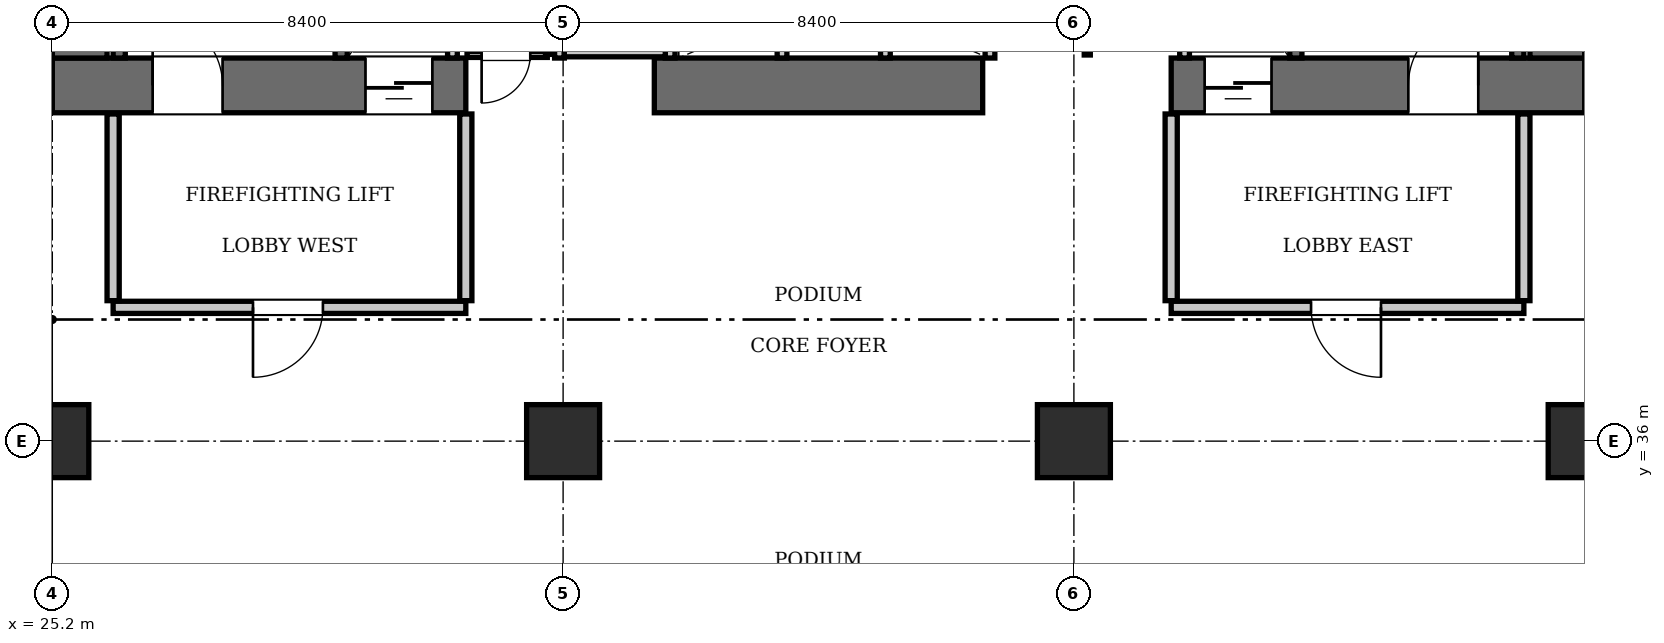
"""IFC4 building model, lengths in metres.
Left out: names, types, materials, properties, quantities, classifications, styles, units other than length and angle.
Written with IfcOpenShell. Run it as: python <this file> out.ifc"""

import sys

from ifc_helpers import new_model, si_unit, direction, frame, frame_2d, origin, origin_2d, place, context, subcontext, project, spatial, rectangle, extrude, element, fill, save


model = new_model("IFC4")
c1 = context("Model", 3, precision=1e-05, world=origin(), true_north=direction((0.0, 1.0)))
c2 = subcontext(c1, "Body", "Model", "MODEL_VIEW")
j1 = project(units=[si_unit("LENGTHUNIT", "METRE"), si_unit("PLANEANGLEUNIT", "RADIAN")], contexts=[c1])
p1 = place(None, origin())
s1 = spatial("IfcSite", under=j1, at=p1, CompositionType="ELEMENT")
p2 = place(p1, origin())
s2 = spatial("IfcBuilding", under=s1, at=p2, CompositionType="ELEMENT")
p3 = place(p2, frame((0.0, 0.0, 10.85)))
s3 = spatial("IfcBuildingStorey", under=s2, at=p3, CompositionType="ELEMENT", Elevation=10.85)
p4 = place(p3, frame((25.2, 41.85, 0.0), z_axis=(0.0, 0.0, 1.0), x_axis=(1.0, 0.0, 0.0)))
e1 = element("IfcWall", 1, at=p4, inside=s3, PredefinedType="SHEAR", context=c2, shape_type="SweptSolid", body=[
    extrude(rectangle(XDim=6.8, YDim=0.9, at=frame_2d((3.4, 0.0))), origin(), (0.0, 0.0, 1.0), 5.6),
])
p5 = place(p4, frame((1.65, 0.0, 0.0)))
e2 = element("IfcOpeningElement", 2, at=p5, cuts=e1, PredefinedType="OPENING", context=c2, shape_type="SweptSolid", body=[
    extrude(rectangle(XDim=1.15, YDim=2.15, at=frame_2d((0.575, 1.075))), frame((0.0, 0.46, 0.0), z_axis=(0.0, -1.0, 0.0), x_axis=(1.0, 0.0, 0.0)), (0.0, 0.0, 1.0), 0.92),
])
p6 = place(p4, frame((5.15, 0.0, 0.0)))
e3 = element("IfcOpeningElement", 3, at=p6, cuts=e1, PredefinedType="OPENING", context=c2, shape_type="SweptSolid", body=[
    extrude(rectangle(XDim=1.1, YDim=2.2, at=frame_2d((0.55, 1.1))), frame((0.0, 0.46, 0.0), z_axis=(0.0, -1.0, 0.0), x_axis=(1.0, 0.0, 0.0)), (0.0, 0.0, 1.0), 0.92),
])
p7 = place(p3, frame((35.1, 41.85, 0.0), z_axis=(0.0, 0.0, 1.0), x_axis=(1.0, 0.0, 0.0)))
e4 = element("IfcWall", 4, at=p7, inside=s3, PredefinedType="SHEAR", context=c2, shape_type="SweptSolid", body=[
    extrude(rectangle(XDim=5.4, YDim=0.9, at=frame_2d((2.7, 0.0))), origin(), (0.0, 0.0, 1.0), 5.6),
])
p8 = place(p3, frame((43.6, 41.85, 0.0), z_axis=(0.0, 0.0, 1.0), x_axis=(1.0, 0.0, 0.0)))
e5 = element("IfcWall", 5, at=p8, inside=s3, PredefinedType="SHEAR", context=c2, shape_type="SweptSolid", body=[
    extrude(rectangle(XDim=6.8, YDim=0.9, at=frame_2d((3.4, 0.0))), origin(), (0.0, 0.0, 1.0), 5.6),
])
p9 = place(p8, frame((3.9, 0.0, 0.0)))
e6 = element("IfcOpeningElement", 6, at=p9, cuts=e5, PredefinedType="OPENING", context=c2, shape_type="SweptSolid", body=[
    extrude(rectangle(XDim=1.15, YDim=2.15, at=frame_2d((0.575, 1.075))), frame((0.0, 0.46, 0.0), z_axis=(0.0, -1.0, 0.0), x_axis=(1.0, 0.0, 0.0)), (0.0, 0.0, 1.0), 0.92),
])
p10 = place(p8, frame((0.55, 0.0, 0.0)))
e7 = element("IfcOpeningElement", 7, at=p10, cuts=e5, PredefinedType="OPENING", context=c2, shape_type="SweptSolid", body=[
    extrude(rectangle(XDim=1.1, YDim=2.2, at=frame_2d((0.55, 1.1))), frame((0.0, 0.46, 0.0), z_axis=(0.0, -1.0, 0.0), x_axis=(1.0, 0.0, 0.0)), (0.0, 0.0, 1.0), 0.92),
])
for number, where, z_axis, x_axis in (
    (8, (25.65, 42.3, 0.0), (0.0, 0.0, 1.0), (0.0, 1.0, 0.0)),
    (9, (49.95, 42.3, 0.0), (0.0, 0.0, 1.0), (0.0, 1.0, 0.0)),
):
    element("IfcWall", number, at=place(p3, frame(where, z_axis=z_axis, x_axis=x_axis)), inside=s3, PredefinedType="SHEAR", context=c2, shape_type="SweptSolid", body=[
        extrude(rectangle(XDim=1.6, YDim=0.9, at=frame_2d((0.8, 0.0))), origin(), (0.0, 0.0, 1.0), 5.6),
    ])
for number, where, z_axis, x_axis in (
    (10, (25.2, 36.0, 0.0), (0.0, 0.0, 1.0), (1.0, 0.0, 0.0)),
    (11, (33.6, 36.0, 0.0), (0.0, 0.0, 1.0), (1.0, 0.0, 0.0)),
    (12, (42.0, 36.0, 0.0), (0.0, 0.0, 1.0), (1.0, 0.0, 0.0)),
    (13, (50.4, 36.0, 0.0), (0.0, 0.0, 1.0), (1.0, 0.0, 0.0)),
):
    element("IfcColumn", number, at=place(p3, frame(where, z_axis=z_axis, x_axis=x_axis)), inside=s3, PredefinedType="COLUMN", context=c2, shape_type="SweptSolid", body=[
        extrude(rectangle(XDim=1.2, YDim=1.2, at=origin_2d()), origin(), (0.0, 0.0, 1.0), 5.6),
    ])
p11 = place(p3, frame((29.95, 42.3, 0.0), z_axis=(0.0, 0.0, 1.0), x_axis=(0.0, 1.0, 0.0)))
e14 = element("IfcWall", 14, at=p11, inside=s3, PredefinedType="SOLIDWALL", context=c2, shape_type="SweptSolid", body=[
    extrude(rectangle(XDim=8.85, YDim=0.2, at=frame_2d((4.425, 0.0))), origin(), (0.0, 0.0, 1.0), 5.32),
])
p12 = place(p3, frame((26.3, 42.3, 0.0), z_axis=(0.0, 0.0, 1.0), x_axis=(0.0, 1.0, 0.0)))
e15 = element("IfcWall", 15, at=p12, inside=s3, PredefinedType="SOLIDWALL", context=c2, shape_type="SweptSolid", body=[
    extrude(rectangle(XDim=1.58, YDim=0.2, at=frame_2d((0.79, 0.0))), origin(), (0.0, 0.0, 1.0), 5.32),
])
p13 = place(p3, frame((45.65, 42.3, 0.0), z_axis=(0.0, 0.0, 1.0), x_axis=(0.0, 1.0, 0.0)))
e16 = element("IfcWall", 16, at=p13, inside=s3, PredefinedType="SOLIDWALL", context=c2, shape_type="SweptSolid", body=[
    extrude(rectangle(XDim=8.85, YDim=0.2, at=frame_2d((4.425, 0.0))), origin(), (0.0, 0.0, 1.0), 5.32),
])
p14 = place(p3, frame((49.3, 42.3, 0.0), z_axis=(0.0, 0.0, 1.0), x_axis=(0.0, 1.0, 0.0)))
e17 = element("IfcWall", 17, at=p14, inside=s3, PredefinedType="SOLIDWALL", context=c2, shape_type="SweptSolid", body=[
    extrude(rectangle(XDim=1.58, YDim=0.2, at=frame_2d((0.79, 0.0))), origin(), (0.0, 0.0, 1.0), 5.32),
])
for number, where, z_axis, x_axis in (
    (18, (31.78, 42.3, 0.0), (0.0, 0.0, 1.0), (0.0, 1.0, 0.0)),
    (19, (43.82, 42.3, 0.0), (0.0, 0.0, 1.0), (0.0, 1.0, 0.0)),
):
    element("IfcWall", number, at=place(p3, frame(where, z_axis=z_axis, x_axis=x_axis)), inside=s3, PredefinedType="SOLIDWALL", context=c2, shape_type="SweptSolid", body=[
        extrude(rectangle(XDim=2.44, YDim=0.16, at=frame_2d((1.22, 0.0))), origin(), (0.0, 0.0, 1.0), 5.32),
    ])
for number, where, z_axis, x_axis in (
    (20, (37.2, 42.3, 0.0), (0.0, 0.0, 1.0), (0.0, 1.0, 0.0)),
    (21, (38.9, 42.3, 0.0), (0.0, 0.0, 1.0), (0.0, 1.0, 0.0)),
    (22, (40.62, 42.3, 0.0), (0.0, 0.0, 1.0), (0.0, 1.0, 0.0)),
):
    element("IfcWall", number, at=place(p3, frame(where, z_axis=z_axis, x_axis=x_axis)), inside=s3, PredefinedType="SOLIDWALL", context=c2, shape_type="SweptSolid", body=[
        extrude(rectangle(XDim=2.05, YDim=0.16, at=frame_2d((1.025, 0.0))), origin(), (0.0, 0.0, 1.0), 5.32),
    ])
for number, where, z_axis, x_axis in (
    (23, (33.54, 42.3, 0.0), (0.0, 0.0, 1.0), (0.0, 1.0, 0.0)),
    (24, (35.36, 42.3, 0.0), (0.0, 0.0, 1.0), (0.0, 1.0, 0.0)),
):
    element("IfcWall", number, at=place(p3, frame(where, z_axis=z_axis, x_axis=x_axis)), inside=s3, PredefinedType="SOLIDWALL", context=c2, shape_type="SweptSolid", body=[
        extrude(rectangle(XDim=2.1, YDim=0.16, at=frame_2d((1.05, 0.0))), origin(), (0.0, 0.0, 1.0), 5.32),
    ])
p15 = place(p3, frame((33.62, 42.4, 0.0), z_axis=(0.0, 0.0, 1.0), x_axis=(1.0, 0.0, 0.0)))
e25 = element("IfcWall", 25, at=p15, inside=s3, PredefinedType="SOLIDWALL", context=c2, shape_type="SweptSolid", body=[
    extrude(rectangle(XDim=1.66, YDim=0.16, at=frame_2d((0.83, 0.0))), origin(), (0.0, 0.0, 1.0), 5.32),
])
p16 = place(p3, frame((26.2, 38.2, 0.0), z_axis=(0.0, 0.0, 1.0), x_axis=(1.0, 0.0, 0.0)))
e26 = element("IfcWall", 26, at=p16, inside=s3, PredefinedType="PARTITIONING", context=c2, shape_type="SweptSolid", body=[
    extrude(rectangle(XDim=5.8, YDim=0.2, at=frame_2d((2.9, 0.0))), origin(), (0.0, 0.0, 1.0), 5.32),
])
p17 = place(p16, frame((2.3, 0.0, 0.0)))
e27 = element("IfcOpeningElement", 27, at=p17, cuts=e26, PredefinedType="OPENING", context=c2, shape_type="SweptSolid", body=[
    extrude(rectangle(XDim=1.15, YDim=2.15, at=frame_2d((0.575, 1.075))), frame((0.0, 0.11, 0.0), z_axis=(0.0, -1.0, 0.0), x_axis=(1.0, 0.0, 0.0)), (0.0, 0.0, 1.0), 0.22),
])
for number, where, z_axis, x_axis in (
    (28, (26.2, 38.31, 0.0), (0.0, 0.0, 1.0), (0.0, 1.0, 0.0)),
    (29, (32.0, 38.31, 0.0), (0.0, 0.0, 1.0), (0.0, 1.0, 0.0)),
):
    element("IfcWall", number, at=place(p3, frame(where, z_axis=z_axis, x_axis=x_axis)), inside=s3, PredefinedType="PARTITIONING", context=c2, shape_type="SweptSolid", body=[
        extrude(rectangle(XDim=3.07, YDim=0.2, at=frame_2d((1.535, 0.0))), origin(), (0.0, 0.0, 1.0), 5.32),
    ])
p18 = place(p3, frame((43.6, 38.2, 0.0), z_axis=(0.0, 0.0, 1.0), x_axis=(1.0, 0.0, 0.0)))
e30 = element("IfcWall", 30, at=p18, inside=s3, PredefinedType="PARTITIONING", context=c2, shape_type="SweptSolid", body=[
    extrude(rectangle(XDim=5.8, YDim=0.2, at=frame_2d((2.9, 0.0))), origin(), (0.0, 0.0, 1.0), 5.32),
])
p19 = place(p18, frame((2.3, 0.0, 0.0)))
e31 = element("IfcOpeningElement", 31, at=p19, cuts=e30, PredefinedType="OPENING", context=c2, shape_type="SweptSolid", body=[
    extrude(rectangle(XDim=1.15, YDim=2.15, at=frame_2d((0.575, 1.075))), frame((0.0, 0.11, 0.0), z_axis=(0.0, -1.0, 0.0), x_axis=(1.0, 0.0, 0.0)), (0.0, 0.0, 1.0), 0.22),
])
for number, where, z_axis, x_axis in (
    (32, (43.6, 38.31, 0.0), (0.0, 0.0, 1.0), (0.0, 1.0, 0.0)),
    (33, (49.4, 38.31, 0.0), (0.0, 0.0, 1.0), (0.0, 1.0, 0.0)),
):
    element("IfcWall", number, at=place(p3, frame(where, z_axis=z_axis, x_axis=x_axis)), inside=s3, PredefinedType="PARTITIONING", context=c2, shape_type="SweptSolid", body=[
        extrude(rectangle(XDim=3.07, YDim=0.2, at=frame_2d((1.535, 0.0))), origin(), (0.0, 0.0, 1.0), 5.32),
    ])
p20 = place(p3, frame((32.02, 42.36, 0.0), z_axis=(0.0, 0.0, 1.0), x_axis=(1.0, 0.0, 0.0)))
e34 = element("IfcWall", 34, at=p20, inside=s3, PredefinedType="PARTITIONING", context=c2, shape_type="SweptSolid", body=[
    extrude(rectangle(XDim=1.32, YDim=0.1, at=frame_2d((0.66, 0.0))), origin(), (0.0, 0.0, 1.0), 5.32),
])
p21 = place(p20, frame((0.24, 0.0, 0.0)))
e35 = element("IfcOpeningElement", 35, at=p21, cuts=e34, PredefinedType="OPENING", context=c2, shape_type="SweptSolid", body=[
    extrude(rectangle(XDim=0.8, YDim=2.05, at=frame_2d((0.4, 1.025))), frame((0.0, 0.06, 0.0), z_axis=(0.0, -1.0, 0.0), x_axis=(1.0, 0.0, 0.0)), (0.0, 0.0, 1.0), 0.12),
])
p22 = place(p3, frame((33.36, 42.36, 0.0), z_axis=(0.0, 0.0, 1.0), x_axis=(0.0, 1.0, 0.0)))
e36 = element("IfcWall", 36, at=p22, inside=s3, PredefinedType="PARTITIONING", context=c2, shape_type="SweptSolid", body=[
    extrude(rectangle(XDim=2.58, YDim=0.1, at=frame_2d((1.29, 0.0))), origin(), (0.0, 0.0, 1.0), 5.32),
])
p23 = place(p3, frame((42.22, 42.35, 0.0), z_axis=(0.0, 0.0, 1.0), x_axis=(0.0, 1.0, 0.0)))
e37 = element("IfcWall", 37, at=p23, inside=s3, PredefinedType="PARTITIONING", context=c2, shape_type="SweptSolid", body=[
    extrude(rectangle(XDim=2.61, YDim=0.1, at=frame_2d((1.305, 0.0))), origin(), (0.0, 0.0, 1.0), 5.32),
])
p24 = place(p23, frame((0.65, 0.0, 0.0)))
e38 = element("IfcOpeningElement", 38, at=p24, cuts=e37, PredefinedType="OPENING", context=c2, shape_type="SweptSolid", body=[
    extrude(rectangle(XDim=0.8, YDim=2.05, at=frame_2d((0.4, 1.025))), frame((0.0, 0.06, 0.0), z_axis=(0.0, -1.0, 0.0), x_axis=(1.0, 0.0, 0.0)), (0.0, 0.0, 1.0), 0.12),
])
p25 = place(p5, origin())
e39 = element("IfcDoor", 39, at=p25, inside=s3, OperationType="SINGLE_SWING_LEFT", PredefinedType="DOOR", context=c2, shape_type="SweptSolid", body=[
    extrude(rectangle(XDim=1.15, YDim=2.15, at=frame_2d((0.575, 1.075))), frame((0.0, 0.025, 0.0), z_axis=(0.0, -1.0, 0.0), x_axis=(1.0, 0.0, 0.0)), (0.0, 0.0, 1.0), 0.05),
])
fill(e2, e39)
p26 = place(p9, origin())
e40 = element("IfcDoor", 40, at=p26, inside=s3, OperationType="SINGLE_SWING_RIGHT", PredefinedType="DOOR", context=c2, shape_type="SweptSolid", body=[
    extrude(rectangle(XDim=1.15, YDim=2.15, at=frame_2d((0.575, 1.075))), frame((0.0, 0.025, 0.0), z_axis=(0.0, -1.0, 0.0), x_axis=(1.0, 0.0, 0.0)), (0.0, 0.0, 1.0), 0.05),
])
fill(e6, e40)
p27 = place(p6, frame((1.1, 0.0, 0.0), z_axis=(0.0, 0.0, 1.0), x_axis=(-1.0, 0.0, 0.0)))
e41 = element("IfcDoor", 41, at=p27, inside=s3, OperationType="SLIDING_TO_LEFT", PredefinedType="DOOR", context=c2, shape_type="SweptSolid", body=[
    extrude(rectangle(XDim=1.1, YDim=2.2, at=frame_2d((0.55, 1.1))), frame((0.0, 0.025, 0.0), z_axis=(0.0, -1.0, 0.0), x_axis=(1.0, 0.0, 0.0)), (0.0, 0.0, 1.0), 0.05),
])
fill(e3, e41)
p28 = place(p10, frame((1.1, 0.0, 0.0), z_axis=(0.0, 0.0, 1.0), x_axis=(-1.0, 0.0, 0.0)))
e42 = element("IfcDoor", 42, at=p28, inside=s3, OperationType="SLIDING_TO_LEFT", PredefinedType="DOOR", context=c2, shape_type="SweptSolid", body=[
    extrude(rectangle(XDim=1.1, YDim=2.2, at=frame_2d((0.55, 1.1))), frame((0.0, 0.025, 0.0), z_axis=(0.0, -1.0, 0.0), x_axis=(1.0, 0.0, 0.0)), (0.0, 0.0, 1.0), 0.05),
])
fill(e7, e42)
p29 = place(p17, frame((1.15, 0.0, 0.0), z_axis=(0.0, 0.0, 1.0), x_axis=(-1.0, 0.0, 0.0)))
e43 = element("IfcDoor", 43, at=p29, inside=s3, OperationType="SINGLE_SWING_RIGHT", PredefinedType="DOOR", context=c2, shape_type="SweptSolid", body=[
    extrude(rectangle(XDim=1.15, YDim=2.15, at=frame_2d((0.575, 1.075))), frame((0.0, 0.025, 0.0), z_axis=(0.0, -1.0, 0.0), x_axis=(1.0, 0.0, 0.0)), (0.0, 0.0, 1.0), 0.05),
])
fill(e27, e43)
p30 = place(p19, frame((1.15, 0.0, 0.0), z_axis=(0.0, 0.0, 1.0), x_axis=(-1.0, 0.0, 0.0)))
e44 = element("IfcDoor", 44, at=p30, inside=s3, OperationType="SINGLE_SWING_LEFT", PredefinedType="DOOR", context=c2, shape_type="SweptSolid", body=[
    extrude(rectangle(XDim=1.15, YDim=2.15, at=frame_2d((0.575, 1.075))), frame((0.0, 0.025, 0.0), z_axis=(0.0, -1.0, 0.0), x_axis=(1.0, 0.0, 0.0)), (0.0, 0.0, 1.0), 0.05),
])
fill(e31, e44)
p31 = place(p21, frame((0.8, 0.0, 0.0), z_axis=(0.0, 0.0, 1.0), x_axis=(-1.0, 0.0, 0.0)))
e45 = element("IfcDoor", 45, at=p31, inside=s3, OperationType="SINGLE_SWING_RIGHT", PredefinedType="DOOR", context=c2, shape_type="SweptSolid", body=[
    extrude(rectangle(XDim=0.8, YDim=2.05, at=frame_2d((0.4, 1.025))), frame((0.0, 0.025, 0.0), z_axis=(0.0, -1.0, 0.0), x_axis=(1.0, 0.0, 0.0)), (0.0, 0.0, 1.0), 0.05),
])
fill(e35, e45)
save(model, sys.argv[1])
